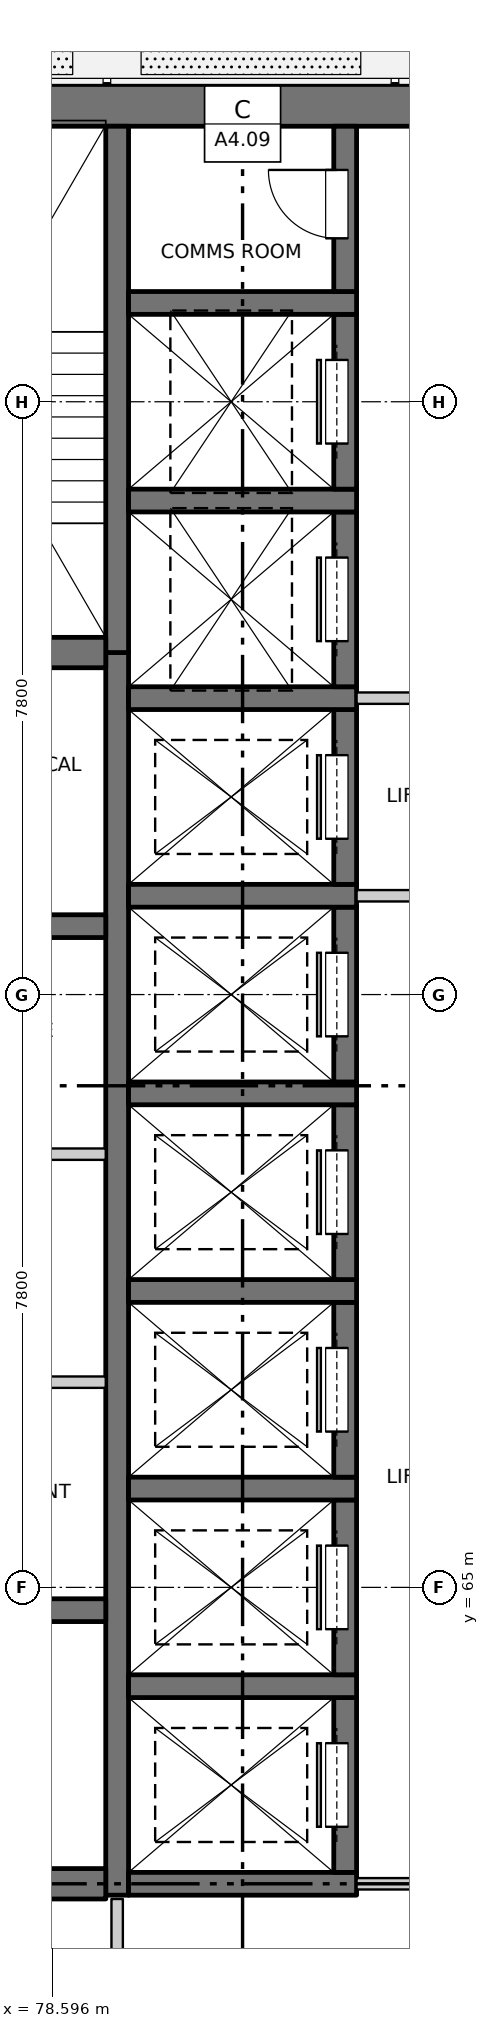
"""IFC4 building model, lengths in metres.
Left out: names, types, materials, properties, quantities, classifications, styles, units other than length and angle.
Written with IfcOpenShell. Run it as: python <this file> out.ifc"""

import sys

from ifc_helpers import new_model, si_unit, direction, frame, frame_2d, origin, place, context, subcontext, project, spatial, rectangle, extrude, element, fill, save


model = new_model("IFC4")
c1 = context("Model", 3, precision=1e-05, world=origin(), true_north=direction((0.0, 1.0)))
c2 = subcontext(c1, "Body", "Model", "MODEL_VIEW")
j1 = project(units=[si_unit("LENGTHUNIT", "METRE"), si_unit("PLANEANGLEUNIT", "RADIAN")], contexts=[c1])
p1 = place(None, origin())
s1 = spatial("IfcSite", under=j1, at=p1, CompositionType="ELEMENT")
p2 = place(p1, origin())
s2 = spatial("IfcBuilding", under=s1, at=p2, CompositionType="ELEMENT")
p3 = place(p2, frame((0.0, 0.0, 99.9)))
s3 = spatial("IfcBuildingStorey", under=s2, at=p3, CompositionType="ELEMENT", Elevation=99.9)
p4 = place(p3, frame((75.525, 84.5, -0.3), z_axis=(0.0, 0.0, 1.0), x_axis=(1.0, 0.0, 0.0)))
e1 = element("IfcWall", 1, at=p4, inside=s3, PredefinedType="SOLIDWALL", context=c2, shape_type="SweptSolid", body=[
    extrude(rectangle(XDim=18.95, YDim=0.55, at=frame_2d((9.475, 0.0))), origin(), (0.0, 0.0, 1.0), 3.45),
])
p5 = place(p3, frame((79.45, 60.95, -0.3), z_axis=(0.0, 0.0, 1.0), x_axis=(0.0, 1.0, 0.0)))
e2 = element("IfcWall", 2, at=p5, inside=s3, PredefinedType="SOLIDWALL", context=c2, shape_type="SweptSolid", body=[
    extrude(rectangle(XDim=16.35, YDim=0.3, at=frame_2d((8.175, 0.0))), origin(), (0.0, 0.0, 1.0), 3.45),
])
p6 = place(p3, frame((79.45, 77.3, -0.3), z_axis=(0.0, 0.0, 1.0), x_axis=(0.0, 1.0, 0.0)))
e3 = element("IfcWall", 3, at=p6, inside=s3, PredefinedType="SOLIDWALL", context=c2, shape_type="SweptSolid", body=[
    extrude(rectangle(XDim=6.925, YDim=0.3, at=frame_2d((3.462, 0.0))), origin(), (0.0, 0.0, 1.0), 3.45),
])
p7 = place(p3, frame((79.6, 61.1, -0.3), z_axis=(0.0, 0.0, 1.0), x_axis=(1.0, 0.0, 0.0)))
e4 = element("IfcWall", 4, at=p7, inside=s3, PredefinedType="SOLIDWALL", context=c2, shape_type="SweptSolid", body=[
    extrude(rectangle(XDim=3.0, YDim=0.3, at=frame_2d((1.5, 0.0))), origin(), (0.0, 0.0, 1.0), 3.45),
])
p8 = place(p3, frame((82.45, 61.25, -0.3), z_axis=(0.0, 0.0, 1.0), x_axis=(0.0, 1.0, 0.0)))
e5 = element("IfcWall", 5, at=p8, inside=s3, PredefinedType="SOLIDWALL", context=c2, shape_type="SweptSolid", body=[
    extrude(rectangle(XDim=2.3, YDim=0.3, at=frame_2d((1.15, 0.0))), origin(), (0.0, 0.0, 1.0), 3.45),
])
p9 = place(p8, frame((0.6, 0.0, 0.3)))
e6 = element("IfcOpeningElement", 6, at=p9, cuts=e5, PredefinedType="OPENING", context=c2, shape_type="SweptSolid", body=[
    extrude(rectangle(XDim=1.1, YDim=2.1, at=frame_2d((0.55, 1.05))), frame((0.0, 0.16, 0.0), z_axis=(0.0, -1.0, 0.0), x_axis=(1.0, 0.0, 0.0)), (0.0, 0.0, 1.0), 0.32),
])
p10 = place(p3, frame((79.6, 63.7, -0.3), z_axis=(0.0, 0.0, 1.0), x_axis=(1.0, 0.0, 0.0)))
e7 = element("IfcWall", 7, at=p10, inside=s3, PredefinedType="SOLIDWALL", context=c2, shape_type="SweptSolid", body=[
    extrude(rectangle(XDim=3.0, YDim=0.3, at=frame_2d((1.5, 0.0))), origin(), (0.0, 0.0, 1.0), 3.45),
])
p11 = place(p3, frame((82.45, 63.85, -0.3), z_axis=(0.0, 0.0, 1.0), x_axis=(0.0, 1.0, 0.0)))
e8 = element("IfcWall", 8, at=p11, inside=s3, PredefinedType="SOLIDWALL", context=c2, shape_type="SweptSolid", body=[
    extrude(rectangle(XDim=2.3, YDim=0.3, at=frame_2d((1.15, 0.0))), origin(), (0.0, 0.0, 1.0), 3.45),
])
p12 = place(p11, frame((0.6, 0.0, 0.3)))
e9 = element("IfcOpeningElement", 9, at=p12, cuts=e8, PredefinedType="OPENING", context=c2, shape_type="SweptSolid", body=[
    extrude(rectangle(XDim=1.1, YDim=2.1, at=frame_2d((0.55, 1.05))), frame((0.0, 0.16, 0.0), z_axis=(0.0, -1.0, 0.0), x_axis=(1.0, 0.0, 0.0)), (0.0, 0.0, 1.0), 0.32),
])
p13 = place(p3, frame((79.6, 66.3, -0.3), z_axis=(0.0, 0.0, 1.0), x_axis=(1.0, 0.0, 0.0)))
e10 = element("IfcWall", 10, at=p13, inside=s3, PredefinedType="SOLIDWALL", context=c2, shape_type="SweptSolid", body=[
    extrude(rectangle(XDim=3.0, YDim=0.3, at=frame_2d((1.5, 0.0))), origin(), (0.0, 0.0, 1.0), 3.45),
])
p14 = place(p3, frame((82.45, 66.45, -0.3), z_axis=(0.0, 0.0, 1.0), x_axis=(0.0, 1.0, 0.0)))
e11 = element("IfcWall", 11, at=p14, inside=s3, PredefinedType="SOLIDWALL", context=c2, shape_type="SweptSolid", body=[
    extrude(rectangle(XDim=2.3, YDim=0.3, at=frame_2d((1.15, 0.0))), origin(), (0.0, 0.0, 1.0), 3.45),
])
p15 = place(p14, frame((0.6, 0.0, 0.3)))
e12 = element("IfcOpeningElement", 12, at=p15, cuts=e11, PredefinedType="OPENING", context=c2, shape_type="SweptSolid", body=[
    extrude(rectangle(XDim=1.1, YDim=2.1, at=frame_2d((0.55, 1.05))), frame((0.0, 0.16, 0.0), z_axis=(0.0, -1.0, 0.0), x_axis=(1.0, 0.0, 0.0)), (0.0, 0.0, 1.0), 0.32),
])
p16 = place(p3, frame((79.6, 68.9, -0.3), z_axis=(0.0, 0.0, 1.0), x_axis=(1.0, 0.0, 0.0)))
e13 = element("IfcWall", 13, at=p16, inside=s3, PredefinedType="SOLIDWALL", context=c2, shape_type="SweptSolid", body=[
    extrude(rectangle(XDim=3.0, YDim=0.3, at=frame_2d((1.5, 0.0))), origin(), (0.0, 0.0, 1.0), 3.45),
])
p17 = place(p3, frame((82.45, 69.05, -0.3), z_axis=(0.0, 0.0, 1.0), x_axis=(0.0, 1.0, 0.0)))
e14 = element("IfcWall", 14, at=p17, inside=s3, PredefinedType="SOLIDWALL", context=c2, shape_type="SweptSolid", body=[
    extrude(rectangle(XDim=2.3, YDim=0.3, at=frame_2d((1.15, 0.0))), origin(), (0.0, 0.0, 1.0), 3.45),
])
p18 = place(p17, frame((0.6, 0.0, 0.3)))
e15 = element("IfcOpeningElement", 15, at=p18, cuts=e14, PredefinedType="OPENING", context=c2, shape_type="SweptSolid", body=[
    extrude(rectangle(XDim=1.1, YDim=2.1, at=frame_2d((0.55, 1.05))), frame((0.0, 0.16, 0.0), z_axis=(0.0, -1.0, 0.0), x_axis=(1.0, 0.0, 0.0)), (0.0, 0.0, 1.0), 0.32),
])
p19 = place(p3, frame((79.6, 71.5, -0.3), z_axis=(0.0, 0.0, 1.0), x_axis=(1.0, 0.0, 0.0)))
e16 = element("IfcWall", 16, at=p19, inside=s3, PredefinedType="SOLIDWALL", context=c2, shape_type="SweptSolid", body=[
    extrude(rectangle(XDim=3.0, YDim=0.3, at=frame_2d((1.5, 0.0))), origin(), (0.0, 0.0, 1.0), 3.45),
])
p20 = place(p3, frame((82.45, 71.65, -0.3), z_axis=(0.0, 0.0, 1.0), x_axis=(0.0, 1.0, 0.0)))
e17 = element("IfcWall", 17, at=p20, inside=s3, PredefinedType="SOLIDWALL", context=c2, shape_type="SweptSolid", body=[
    extrude(rectangle(XDim=2.3, YDim=0.3, at=frame_2d((1.15, 0.0))), origin(), (0.0, 0.0, 1.0), 3.45),
])
p21 = place(p20, frame((0.6, 0.0, 0.3)))
e18 = element("IfcOpeningElement", 18, at=p21, cuts=e17, PredefinedType="OPENING", context=c2, shape_type="SweptSolid", body=[
    extrude(rectangle(XDim=1.1, YDim=2.1, at=frame_2d((0.55, 1.05))), frame((0.0, 0.16, 0.0), z_axis=(0.0, -1.0, 0.0), x_axis=(1.0, 0.0, 0.0)), (0.0, 0.0, 1.0), 0.32),
])
p22 = place(p3, frame((79.6, 74.1, -0.3), z_axis=(0.0, 0.0, 1.0), x_axis=(1.0, 0.0, 0.0)))
e19 = element("IfcWall", 19, at=p22, inside=s3, PredefinedType="SOLIDWALL", context=c2, shape_type="SweptSolid", body=[
    extrude(rectangle(XDim=3.0, YDim=0.3, at=frame_2d((1.5, 0.0))), origin(), (0.0, 0.0, 1.0), 3.45),
])
p23 = place(p3, frame((82.45, 74.25, -0.3), z_axis=(0.0, 0.0, 1.0), x_axis=(0.0, 1.0, 0.0)))
e20 = element("IfcWall", 20, at=p23, inside=s3, PredefinedType="SOLIDWALL", context=c2, shape_type="SweptSolid", body=[
    extrude(rectangle(XDim=2.3, YDim=0.3, at=frame_2d((1.15, 0.0))), origin(), (0.0, 0.0, 1.0), 3.45),
])
p24 = place(p23, frame((0.6, 0.0, 0.3)))
e21 = element("IfcOpeningElement", 21, at=p24, cuts=e20, PredefinedType="OPENING", context=c2, shape_type="SweptSolid", body=[
    extrude(rectangle(XDim=1.1, YDim=2.1, at=frame_2d((0.55, 1.05))), frame((0.0, 0.16, 0.0), z_axis=(0.0, -1.0, 0.0), x_axis=(1.0, 0.0, 0.0)), (0.0, 0.0, 1.0), 0.32),
])
p25 = place(p3, frame((79.6, 76.7, -0.3), z_axis=(0.0, 0.0, 1.0), x_axis=(1.0, 0.0, 0.0)))
e22 = element("IfcWall", 22, at=p25, inside=s3, PredefinedType="SOLIDWALL", context=c2, shape_type="SweptSolid", body=[
    extrude(rectangle(XDim=3.0, YDim=0.3, at=frame_2d((1.5, 0.0))), origin(), (0.0, 0.0, 1.0), 3.45),
])
p26 = place(p3, frame((82.45, 76.85, -0.3), z_axis=(0.0, 0.0, 1.0), x_axis=(0.0, 1.0, 0.0)))
e23 = element("IfcWall", 23, at=p26, inside=s3, PredefinedType="SOLIDWALL", context=c2, shape_type="SweptSolid", body=[
    extrude(rectangle(XDim=2.3, YDim=0.3, at=frame_2d((1.15, 0.0))), origin(), (0.0, 0.0, 1.0), 3.45),
])
p27 = place(p26, frame((0.6, 0.0, 0.3)))
e24 = element("IfcOpeningElement", 24, at=p27, cuts=e23, PredefinedType="OPENING", context=c2, shape_type="SweptSolid", body=[
    extrude(rectangle(XDim=1.1, YDim=2.1, at=frame_2d((0.55, 1.05))), frame((0.0, 0.16, 0.0), z_axis=(0.0, -1.0, 0.0), x_axis=(1.0, 0.0, 0.0)), (0.0, 0.0, 1.0), 0.32),
])
p28 = place(p3, frame((79.6, 79.3, -0.3), z_axis=(0.0, 0.0, 1.0), x_axis=(1.0, 0.0, 0.0)))
e25 = element("IfcWall", 25, at=p28, inside=s3, PredefinedType="SOLIDWALL", context=c2, shape_type="SweptSolid", body=[
    extrude(rectangle(XDim=3.0, YDim=0.3, at=frame_2d((1.5, 0.0))), origin(), (0.0, 0.0, 1.0), 3.45),
])
p29 = place(p3, frame((82.45, 79.45, -0.3), z_axis=(0.0, 0.0, 1.0), x_axis=(0.0, 1.0, 0.0)))
e26 = element("IfcWall", 26, at=p29, inside=s3, PredefinedType="SOLIDWALL", context=c2, shape_type="SweptSolid", body=[
    extrude(rectangle(XDim=2.3, YDim=0.3, at=frame_2d((1.15, 0.0))), origin(), (0.0, 0.0, 1.0), 3.45),
])
p30 = place(p29, frame((0.6, 0.0, 0.3)))
e27 = element("IfcOpeningElement", 27, at=p30, cuts=e26, PredefinedType="OPENING", context=c2, shape_type="SweptSolid", body=[
    extrude(rectangle(XDim=1.1, YDim=2.1, at=frame_2d((0.55, 1.05))), frame((0.0, 0.16, 0.0), z_axis=(0.0, -1.0, 0.0), x_axis=(1.0, 0.0, 0.0)), (0.0, 0.0, 1.0), 0.32),
])
p31 = place(p3, frame((79.6, 81.9, -0.3), z_axis=(0.0, 0.0, 1.0), x_axis=(1.0, 0.0, 0.0)))
e28 = element("IfcWall", 28, at=p31, inside=s3, PredefinedType="SOLIDWALL", context=c2, shape_type="SweptSolid", body=[
    extrude(rectangle(XDim=3.0, YDim=0.3, at=frame_2d((1.5, 0.0))), origin(), (0.0, 0.0, 1.0), 3.45),
])
p32 = place(p3, frame((82.45, 82.05, -0.3), z_axis=(0.0, 0.0, 1.0), x_axis=(0.0, 1.0, 0.0)))
e29 = element("IfcWall", 29, at=p32, inside=s3, PredefinedType="SOLIDWALL", context=c2, shape_type="SweptSolid", body=[
    extrude(rectangle(XDim=2.175, YDim=0.3, at=frame_2d((1.087, 0.0))), origin(), (0.0, 0.0, 1.0), 3.45),
])
p33 = place(p32, frame((0.7, 0.0, 0.3)))
e30 = element("IfcOpeningElement", 30, at=p33, cuts=e29, PredefinedType="OPENING", context=c2, shape_type="SweptSolid", body=[
    extrude(rectangle(XDim=0.9, YDim=2.1, at=frame_2d((0.45, 1.05))), frame((0.0, 0.16, 0.0), z_axis=(0.0, -1.0, 0.0), x_axis=(1.0, 0.0, 0.0)), (0.0, 0.0, 1.0), 0.32),
])
p34 = place(p3, frame((75.525, 61.1, -0.3), z_axis=(0.0, 0.0, 1.0), x_axis=(1.0, 0.0, 0.0)))
e31 = element("IfcWall", 31, at=p34, inside=s3, PredefinedType="SOLIDWALL", context=c2, shape_type="SweptSolid", body=[
    extrude(rectangle(XDim=3.775, YDim=0.4, at=frame_2d((1.888, 0.0))), origin(), (0.0, 0.0, 1.0), 3.45),
])
for number, where, z_axis, x_axis in (
    (32, (75.525, 64.7, -0.3), (0.0, 0.0, 1.0), (1.0, 0.0, 0.0)),
    (33, (75.525, 73.7, -0.3), (0.0, 0.0, 1.0), (1.0, 0.0, 0.0)),
):
    element("IfcWall", number, at=place(p3, frame(where, z_axis=z_axis, x_axis=x_axis)), inside=s3, PredefinedType="SOLIDWALL", context=c2, shape_type="SweptSolid", body=[
        extrude(rectangle(XDim=3.775, YDim=0.3, at=frame_2d((1.888, 0.0))), origin(), (0.0, 0.0, 1.0), 3.45),
    ])
p35 = place(p3, frame((75.525, 77.3, -0.3), z_axis=(0.0, 0.0, 1.0), x_axis=(1.0, 0.0, 0.0)))
e34 = element("IfcWall", 34, at=p35, inside=s3, PredefinedType="SOLIDWALL", context=c2, shape_type="SweptSolid", body=[
    extrude(rectangle(XDim=3.775, YDim=0.4, at=frame_2d((1.888, 0.0))), origin(), (0.0, 0.0, 1.0), 3.45),
])
p36 = place(p3, frame((82.6, 61.1, 0.0), z_axis=(0.0, 0.0, 1.0), x_axis=(1.0, 0.0, 0.0)))
e35 = element("IfcWall", 35, at=p36, inside=s3, PredefinedType="PARTITIONING", context=c2, shape_type="SweptSolid", body=[
    extrude(rectangle(XDim=4.8, YDim=0.15, at=frame_2d((2.4, 0.0))), origin(), (0.0, 0.0, 1.0), 3.15),
])
p37 = place(p36, frame((1.5, 0.0, 0.0)))
e36 = element("IfcOpeningElement", 36, at=p37, cuts=e35, PredefinedType="OPENING", context=c2, shape_type="SweptSolid", body=[
    extrude(rectangle(XDim=1.8, YDim=2.1, at=frame_2d((0.9, 1.05))), frame((0.0, 0.085, 0.0), z_axis=(0.0, -1.0, 0.0), x_axis=(1.0, 0.0, 0.0)), (0.0, 0.0, 1.0), 0.17),
])
for number, where, z_axis, x_axis in (
    (37, (75.525, 67.7, 0.0), (0.0, 0.0, 1.0), (1.0, 0.0, 0.0)),
    (38, (75.525, 70.7, 0.0), (0.0, 0.0, 1.0), (1.0, 0.0, 0.0)),
):
    element("IfcWall", number, at=place(p3, frame(where, z_axis=z_axis, x_axis=x_axis)), inside=s3, PredefinedType="PARTITIONING", context=c2, shape_type="SweptSolid", body=[
        extrude(rectangle(XDim=3.775, YDim=0.15, at=frame_2d((1.887, 0.0))), origin(), (0.0, 0.0, 1.0), 3.15),
    ])
p38 = place(p3, frame((82.6, 74.1, 0.0), z_axis=(0.0, 0.0, 1.0), x_axis=(1.0, 0.0, 0.0)))
e39 = element("IfcWall", 39, at=p38, inside=s3, PredefinedType="PARTITIONING", context=c2, shape_type="SweptSolid", body=[
    extrude(rectangle(XDim=4.8, YDim=0.15, at=frame_2d((2.4, 0.0))), origin(), (0.0, 0.0, 1.0), 3.15),
])
p39 = place(p38, frame((1.5, 0.0, 0.0)))
e40 = element("IfcOpeningElement", 40, at=p39, cuts=e39, PredefinedType="OPENING", context=c2, shape_type="SweptSolid", body=[
    extrude(rectangle(XDim=1.8, YDim=2.1, at=frame_2d((0.9, 1.05))), frame((0.0, 0.085, 0.0), z_axis=(0.0, -1.0, 0.0), x_axis=(1.0, 0.0, 0.0)), (0.0, 0.0, 1.0), 0.17),
])
p40 = place(p3, frame((82.6, 76.7, 0.0), z_axis=(0.0, 0.0, 1.0), x_axis=(1.0, 0.0, 0.0)))
e41 = element("IfcWall", 41, at=p40, inside=s3, PredefinedType="PARTITIONING", context=c2, shape_type="SweptSolid", body=[
    extrude(rectangle(XDim=4.8, YDim=0.15, at=frame_2d((2.4, 0.0))), origin(), (0.0, 0.0, 1.0), 3.15),
])
p41 = place(p40, frame((1.5, 0.0, 0.0)))
e42 = element("IfcOpeningElement", 42, at=p41, cuts=e41, PredefinedType="OPENING", context=c2, shape_type="SweptSolid", body=[
    extrude(rectangle(XDim=1.8, YDim=2.1, at=frame_2d((0.9, 1.05))), frame((0.0, 0.085, 0.0), z_axis=(0.0, -1.0, 0.0), x_axis=(1.0, 0.0, 0.0)), (0.0, 0.0, 1.0), 0.17),
])
p42 = place(p3, frame((79.45, 55.525, 0.0), z_axis=(0.0, 0.0, 1.0), x_axis=(0.0, 1.0, 0.0)))
e43 = element("IfcWall", 43, at=p42, inside=s3, PredefinedType="PARTITIONING", context=c2, shape_type="SweptSolid", body=[
    extrude(rectangle(XDim=5.375, YDim=0.15, at=frame_2d((2.688, 0.0))), origin(), (0.0, 0.0, 1.0), 3.15),
])
p43 = place(p42, frame((2.175, 0.0, 0.0)))
e44 = element("IfcOpeningElement", 44, at=p43, cuts=e43, PredefinedType="OPENING", context=c2, shape_type="SweptSolid", body=[
    extrude(rectangle(XDim=0.9, YDim=2.1, at=frame_2d((0.45, 1.05))), frame((0.0, 0.085, 0.0), z_axis=(0.0, -1.0, 0.0), x_axis=(1.0, 0.0, 0.0)), (0.0, 0.0, 1.0), 0.17),
])
p44 = place(p9, origin())
e45 = element("IfcDoor", 45, at=p44, inside=s3, OperationType="SLIDING_TO_RIGHT", PredefinedType="DOOR", context=c2, shape_type="SweptSolid", body=[
    extrude(rectangle(XDim=1.1, YDim=2.1, at=frame_2d((0.55, 1.05))), frame((0.0, 0.135, 0.0), z_axis=(0.0, -1.0, 0.0), x_axis=(1.0, 0.0, 0.0)), (0.0, 0.0, 1.0), 0.05),
])
fill(e6, e45)
p45 = place(p12, origin())
e46 = element("IfcDoor", 46, at=p45, inside=s3, OperationType="SLIDING_TO_RIGHT", PredefinedType="DOOR", context=c2, shape_type="SweptSolid", body=[
    extrude(rectangle(XDim=1.1, YDim=2.1, at=frame_2d((0.55, 1.05))), frame((0.0, 0.135, 0.0), z_axis=(0.0, -1.0, 0.0), x_axis=(1.0, 0.0, 0.0)), (0.0, 0.0, 1.0), 0.05),
])
fill(e9, e46)
p46 = place(p15, origin())
e47 = element("IfcDoor", 47, at=p46, inside=s3, OperationType="SLIDING_TO_RIGHT", PredefinedType="DOOR", context=c2, shape_type="SweptSolid", body=[
    extrude(rectangle(XDim=1.1, YDim=2.1, at=frame_2d((0.55, 1.05))), frame((0.0, 0.135, 0.0), z_axis=(0.0, -1.0, 0.0), x_axis=(1.0, 0.0, 0.0)), (0.0, 0.0, 1.0), 0.05),
])
fill(e12, e47)
p47 = place(p18, origin())
e48 = element("IfcDoor", 48, at=p47, inside=s3, OperationType="SLIDING_TO_LEFT", PredefinedType="DOOR", context=c2, shape_type="SweptSolid", body=[
    extrude(rectangle(XDim=1.1, YDim=2.1, at=frame_2d((0.55, 1.05))), frame((0.0, 0.135, 0.0), z_axis=(0.0, -1.0, 0.0), x_axis=(1.0, 0.0, 0.0)), (0.0, 0.0, 1.0), 0.05),
])
fill(e15, e48)
p48 = place(p21, origin())
e49 = element("IfcDoor", 49, at=p48, inside=s3, OperationType="SLIDING_TO_LEFT", PredefinedType="DOOR", context=c2, shape_type="SweptSolid", body=[
    extrude(rectangle(XDim=1.1, YDim=2.1, at=frame_2d((0.55, 1.05))), frame((0.0, 0.135, 0.0), z_axis=(0.0, -1.0, 0.0), x_axis=(1.0, 0.0, 0.0)), (0.0, 0.0, 1.0), 0.05),
])
fill(e18, e49)
p49 = place(p24, origin())
e50 = element("IfcDoor", 50, at=p49, inside=s3, OperationType="SLIDING_TO_LEFT", PredefinedType="DOOR", context=c2, shape_type="SweptSolid", body=[
    extrude(rectangle(XDim=1.1, YDim=2.1, at=frame_2d((0.55, 1.05))), frame((0.0, 0.135, 0.0), z_axis=(0.0, -1.0, 0.0), x_axis=(1.0, 0.0, 0.0)), (0.0, 0.0, 1.0), 0.05),
])
fill(e21, e50)
p50 = place(p27, origin())
e51 = element("IfcDoor", 51, at=p50, inside=s3, OperationType="SLIDING_TO_LEFT", PredefinedType="DOOR", context=c2, shape_type="SweptSolid", body=[
    extrude(rectangle(XDim=1.1, YDim=2.1, at=frame_2d((0.55, 1.05))), frame((0.0, 0.135, 0.0), z_axis=(0.0, -1.0, 0.0), x_axis=(1.0, 0.0, 0.0)), (0.0, 0.0, 1.0), 0.05),
])
fill(e24, e51)
p51 = place(p30, origin())
e52 = element("IfcDoor", 52, at=p51, inside=s3, OperationType="SLIDING_TO_LEFT", PredefinedType="DOOR", context=c2, shape_type="SweptSolid", body=[
    extrude(rectangle(XDim=1.1, YDim=2.1, at=frame_2d((0.55, 1.05))), frame((0.0, 0.135, 0.0), z_axis=(0.0, -1.0, 0.0), x_axis=(1.0, 0.0, 0.0)), (0.0, 0.0, 1.0), 0.05),
])
fill(e27, e52)
p52 = place(p33, origin())
e53 = element("IfcDoor", 53, at=p52, inside=s3, OperationType="SINGLE_SWING_RIGHT", PredefinedType="DOOR", context=c2, shape_type="SweptSolid", body=[
    extrude(rectangle(XDim=0.9, YDim=2.1, at=frame_2d((0.45, 1.05))), frame((0.0, 0.135, 0.0), z_axis=(0.0, -1.0, 0.0), x_axis=(1.0, 0.0, 0.0)), (0.0, 0.0, 1.0), 0.05),
])
fill(e30, e53)
save(model, sys.argv[1])
